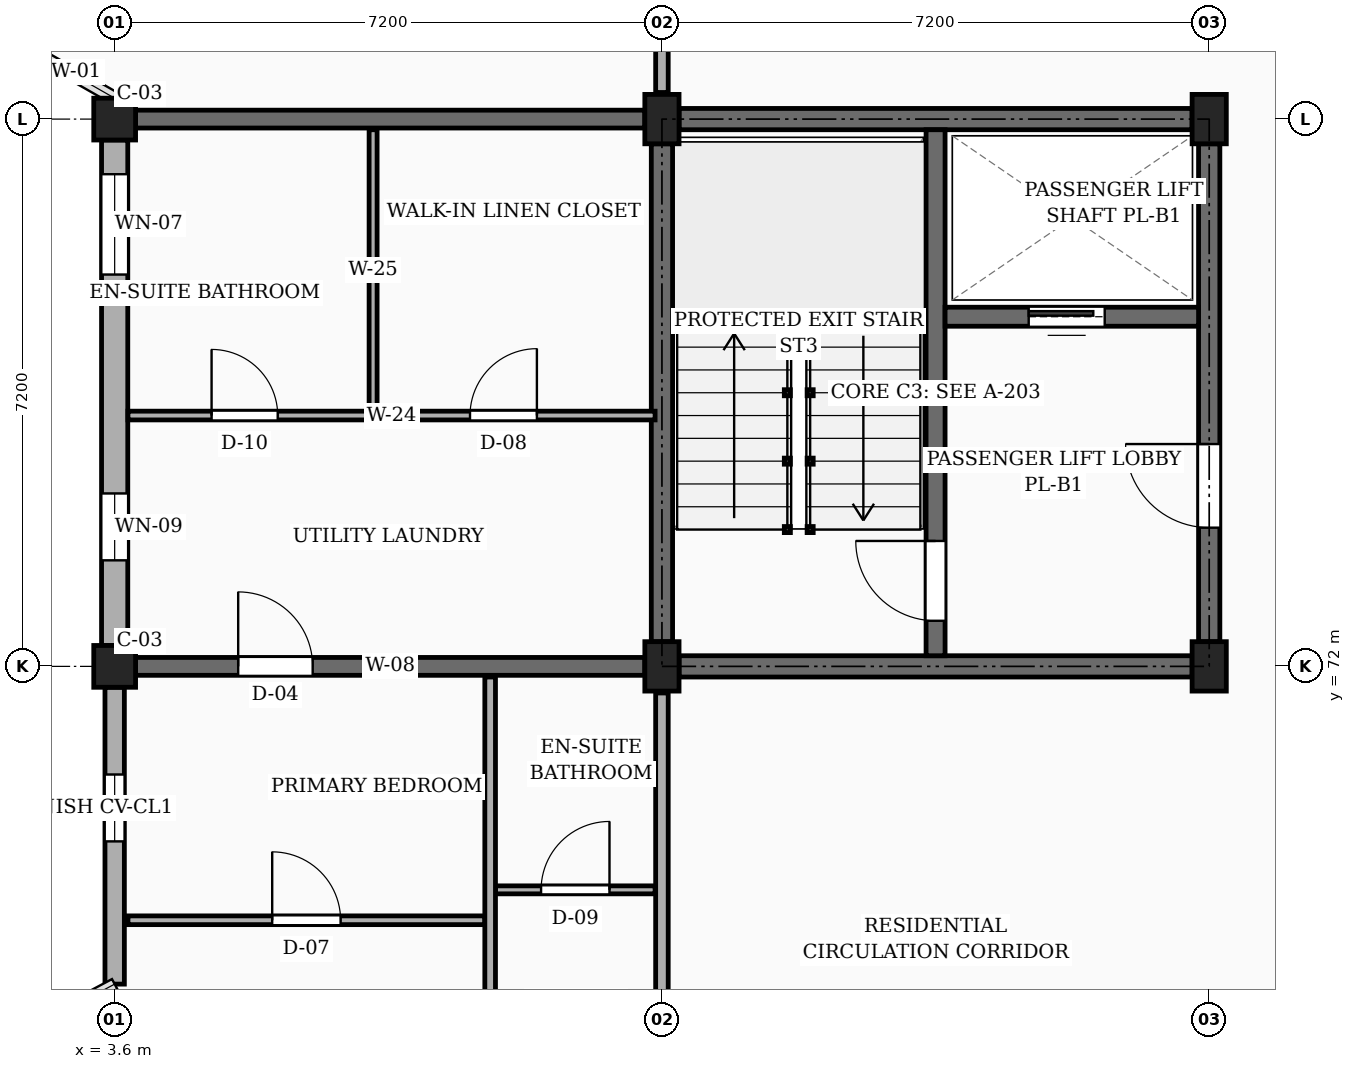
"""IFC4 building model, lengths in metres.
Left out: names, types, materials, properties, quantities, classifications, styles, units other than length and angle.
Written with IfcOpenShell. Run it as: python <this file> out.ifc"""

import sys

from ifc_helpers import new_model, si_unit, direction, frame, frame_2d, origin, origin_2d, place, context, subcontext, project, spatial, rectangle, extrude, element, fill, save


model = new_model("IFC4")
c1 = context("Model", 3, precision=1e-05, world=origin(), true_north=direction((0.0, 1.0)))
c2 = subcontext(c1, "Body", "Model", "MODEL_VIEW")
j1 = project(units=[si_unit("LENGTHUNIT", "METRE"), si_unit("PLANEANGLEUNIT", "RADIAN")], contexts=[c1])
p1 = place(None, origin())
s1 = spatial("IfcSite", under=j1, at=p1, CompositionType="ELEMENT")
p2 = place(p1, origin())
s2 = spatial("IfcBuilding", under=s1, at=p2, CompositionType="ELEMENT")
p3 = place(p2, frame((0.0, 0.0, 17.1)))
s3 = spatial("IfcBuildingStorey", under=s2, at=p3, CompositionType="ELEMENT", Elevation=17.1)
for number, where, z_axis, x_axis in (
    (1, (3.6, 72.0, 0.0), (0.0, 0.0, 1.0), (1.0, 0.0, 0.0)),
    (2, (3.6, 79.2, 0.0), (0.0, 0.0, 1.0), (1.0, 0.0, 0.0)),
):
    element("IfcColumn", number, at=place(p3, frame(where, z_axis=z_axis, x_axis=x_axis)), inside=s3, PredefinedType="COLUMN", context=c2, shape_type="SweptSolid", body=[
        extrude(rectangle(XDim=0.55, YDim=0.55, at=origin_2d()), origin(), (0.0, 0.0, 1.0), 3.15),
    ])
for number, where, z_axis, x_axis in (
    (3, (10.8, 72.0, 0.0), (0.0, 0.0, 1.0), (1.0, 0.0, 0.0)),
    (4, (10.8, 79.2, 0.0), (0.0, 0.0, 1.0), (1.0, 0.0, 0.0)),
    (5, (18.0, 72.0, 0.0), (0.0, 0.0, 1.0), (1.0, 0.0, 0.0)),
    (6, (18.0, 79.2, 0.0), (0.0, 0.0, 1.0), (1.0, 0.0, 0.0)),
):
    element("IfcColumn", number, at=place(p3, frame(where, z_axis=z_axis, x_axis=x_axis)), inside=s3, PredefinedType="COLUMN", context=c2, shape_type="SweptSolid", body=[
        extrude(rectangle(XDim=0.45, YDim=0.65, at=origin_2d()), origin(), (0.0, 0.0, 1.0), 3.15),
    ])
p4 = place(p3, frame((3.875, 72.0, 0.0), z_axis=(0.0, 0.0, 1.0), x_axis=(1.0, 0.0, 0.0)))
e7 = element("IfcWall", 7, at=p4, inside=s3, PredefinedType="SOLIDWALL", context=c2, shape_type="SweptSolid", body=[
    extrude(rectangle(XDim=6.7, YDim=0.235, at=frame_2d((3.35, 0.0))), origin(), (0.0, 0.0, 1.0), 2.21),
])
p5 = place(p4, frame((1.35, 0.0, 0.0)))
e8 = element("IfcOpeningElement", 8, at=p5, cuts=e7, PredefinedType="OPENING", context=c2, shape_type="SweptSolid", body=[
    extrude(rectangle(XDim=0.98, YDim=2.12, at=frame_2d((0.49, 1.06))), frame((0.0, 0.127, 0.0), z_axis=(0.0, -1.0, 0.0), x_axis=(1.0, 0.0, 0.0)), (0.0, 0.0, 1.0), 0.255),
])
p6 = place(p3, frame((3.875, 79.2, 0.0), z_axis=(0.0, 0.0, 1.0), x_axis=(1.0, 0.0, 0.0)))
e9 = element("IfcWall", 9, at=p6, inside=s3, PredefinedType="SOLIDWALL", context=c2, shape_type="SweptSolid", body=[
    extrude(rectangle(XDim=6.7, YDim=0.235, at=frame_2d((3.35, 0.0))), origin(), (0.0, 0.0, 1.0), 2.21),
])
p7 = place(p3, frame((3.6, 78.925, 0.0), z_axis=(0.0, 0.0, 1.0), x_axis=(0.0, -1.0, 0.0)))
e10 = element("IfcWall", 10, at=p7, inside=s3, PredefinedType="SOLIDWALL", context=c2, shape_type="SweptSolid", body=[
    extrude(rectangle(XDim=6.65, YDim=0.345, at=frame_2d((3.325, 0.0))), origin(), (0.0, 0.0, 1.0), 2.48),
])
p8 = place(p7, frame((0.45, 0.0, 0.78)))
e11 = element("IfcOpeningElement", 11, at=p8, cuts=e10, PredefinedType="OPENING", context=c2, shape_type="SweptSolid", body=[
    extrude(rectangle(XDim=1.32, YDim=1.15, at=frame_2d((0.66, 0.575))), frame((0.0, 0.183, 0.0), z_axis=(0.0, -1.0, 0.0), x_axis=(1.0, 0.0, 0.0)), (0.0, 0.0, 1.0), 0.365),
])
p9 = place(p7, frame((4.65, 0.0, 0.78)))
e12 = element("IfcOpeningElement", 12, at=p9, cuts=e10, PredefinedType="OPENING", context=c2, shape_type="SweptSolid", body=[
    extrude(rectangle(XDim=0.88, YDim=1.26, at=frame_2d((0.44, 0.63))), frame((0.0, 0.183, 0.0), z_axis=(0.0, -1.0, 0.0), x_axis=(1.0, 0.0, 0.0)), (0.0, 0.0, 1.0), 0.365),
])
p10 = place(p3, frame((3.6, 71.725, 0.0), z_axis=(0.0, 0.0, 1.0), x_axis=(0.0, -1.0, 0.0)))
e13 = element("IfcWall", 13, at=p10, inside=s3, PredefinedType="SOLIDWALL", context=c2, shape_type="SweptSolid", body=[
    extrude(rectangle(XDim=3.905, YDim=0.255, at=frame_2d((1.953, 0.0))), origin(), (0.0, 0.0, 1.0), 2.48),
])
p11 = place(p10, frame((1.147, 0.0, 0.78)))
e14 = element("IfcOpeningElement", 14, at=p11, cuts=e13, PredefinedType="OPENING", context=c2, shape_type="SweptSolid", body=[
    extrude(rectangle(XDim=0.88, YDim=1.26, at=frame_2d((0.44, 0.63))), frame((0.0, 0.137, 0.0), z_axis=(0.0, -1.0, 0.0), x_axis=(1.0, 0.0, 0.0)), (0.0, 0.0, 1.0), 0.275),
])
p12 = place(p3, frame((10.8, 72.325, 0.0), z_axis=(0.0, 0.0, 1.0), x_axis=(0.0, 1.0, 0.0)))
e15 = element("IfcWall", 15, at=p12, inside=s3, PredefinedType="SHEAR", context=c2, shape_type="SweptSolid", body=[
    extrude(rectangle(XDim=6.55, YDim=0.28, at=frame_2d((3.275, 0.0))), origin(), (0.0, 0.0, 1.0), 2.91),
])
p13 = place(p3, frame((11.025, 79.2, 0.0), z_axis=(0.0, 0.0, 1.0), x_axis=(1.0, 0.0, 0.0)))
e16 = element("IfcWall", 16, at=p13, inside=s3, PredefinedType="SHEAR", context=c2, shape_type="SweptSolid", body=[
    extrude(rectangle(XDim=6.75, YDim=0.28, at=frame_2d((3.375, 0.0))), origin(), (0.0, 0.0, 1.0), 2.91),
])
p14 = place(p3, frame((18.0, 72.325, 0.0), z_axis=(0.0, 0.0, 1.0), x_axis=(0.0, 1.0, 0.0)))
e17 = element("IfcWall", 17, at=p14, inside=s3, PredefinedType="SHEAR", context=c2, shape_type="SweptSolid", body=[
    extrude(rectangle(XDim=6.55, YDim=0.28, at=frame_2d((3.275, 0.0))), origin(), (0.0, 0.0, 1.0), 2.91),
])
p15 = place(p14, frame((1.5, 0.0, 0.0)))
e18 = element("IfcOpeningElement", 18, at=p15, cuts=e17, PredefinedType="OPENING", context=c2, shape_type="SweptSolid", body=[
    extrude(rectangle(XDim=1.1, YDim=2.15, at=frame_2d((0.55, 1.075))), frame((0.0, 0.15, 0.0), z_axis=(0.0, -1.0, 0.0), x_axis=(1.0, 0.0, 0.0)), (0.0, 0.0, 1.0), 0.3),
])
p16 = place(p3, frame((11.025, 72.0, 0.0), z_axis=(0.0, 0.0, 1.0), x_axis=(1.0, 0.0, 0.0)))
e19 = element("IfcWall", 19, at=p16, inside=s3, PredefinedType="SHEAR", context=c2, shape_type="SweptSolid", body=[
    extrude(rectangle(XDim=6.75, YDim=0.28, at=frame_2d((3.375, 0.0))), origin(), (0.0, 0.0, 1.0), 2.91),
])
p17 = place(p3, frame((14.4, 72.14, 0.0), z_axis=(0.0, 0.0, 1.0), x_axis=(0.0, 1.0, 0.0)))
e20 = element("IfcWall", 20, at=p17, inside=s3, PredefinedType="SHEAR", context=c2, shape_type="SweptSolid", body=[
    extrude(rectangle(XDim=6.92, YDim=0.25, at=frame_2d((3.46, 0.0))), origin(), (0.0, 0.0, 1.0), 2.91),
])
p18 = place(p17, frame((0.46, 0.0, 0.0)))
e21 = element("IfcOpeningElement", 21, at=p18, cuts=e20, PredefinedType="OPENING", context=c2, shape_type="SweptSolid", body=[
    extrude(rectangle(XDim=1.05, YDim=2.15, at=frame_2d((0.525, 1.075))), frame((0.0, 0.135, 0.0), z_axis=(0.0, -1.0, 0.0), x_axis=(1.0, 0.0, 0.0)), (0.0, 0.0, 1.0), 0.27),
])
p19 = place(p3, frame((14.525, 76.6, 0.0), z_axis=(0.0, 0.0, 1.0), x_axis=(1.0, 0.0, 0.0)))
e22 = element("IfcWall", 22, at=p19, inside=s3, PredefinedType="SHEAR", context=c2, shape_type="SweptSolid", body=[
    extrude(rectangle(XDim=3.335, YDim=0.25, at=frame_2d((1.667, 0.0))), origin(), (0.0, 0.0, 1.0), 2.91),
])
p20 = place(p19, frame((1.1, 0.0, 0.0)))
e23 = element("IfcOpeningElement", 23, at=p20, cuts=e22, PredefinedType="OPENING", context=c2, shape_type="SweptSolid", body=[
    extrude(rectangle(XDim=1.0, YDim=2.2, at=frame_2d((0.5, 1.1))), frame((0.0, 0.135, 0.0), z_axis=(0.0, -1.0, 0.0), x_axis=(1.0, 0.0, 0.0)), (0.0, 0.0, 1.0), 0.27),
])
p21 = place(p3, frame((10.8, 65.15, 0.0), z_axis=(0.0, 0.0, 1.0), x_axis=(0.0, 1.0, 0.0)))
e24 = element("IfcWall", 24, at=p21, inside=s3, PredefinedType="PARTITIONING", context=c2, shape_type="SweptSolid", body=[
    extrude(rectangle(XDim=6.5, YDim=0.165, at=frame_2d((3.25, 0.0))), origin(), (0.0, 0.0, 1.0), 2.345),
])
p22 = place(p21, frame((1.0, 0.0, 0.0)))
e25 = element("IfcOpeningElement", 25, at=p22, cuts=e24, PredefinedType="OPENING", context=c2, shape_type="SweptSolid", body=[
    extrude(rectangle(XDim=1.0, YDim=2.15, at=frame_2d((0.5, 1.075))), frame((0.0, 0.093, 0.0), z_axis=(0.0, -1.0, 0.0), x_axis=(1.0, 0.0, 0.0)), (0.0, 0.0, 1.0), 0.185),
])
p23 = place(p3, frame((10.8, 79.55, 0.0), z_axis=(0.0, 0.0, 1.0), x_axis=(0.0, 1.0, 0.0)))
e26 = element("IfcWall", 26, at=p23, inside=s3, PredefinedType="PARTITIONING", context=c2, shape_type="SweptSolid", body=[
    extrude(rectangle(XDim=6.5, YDim=0.165, at=frame_2d((3.25, 0.0))), origin(), (0.0, 0.0, 1.0), 2.345),
])
p24 = place(p23, frame((1.1, 0.0, 0.0)))
e27 = element("IfcOpeningElement", 27, at=p24, cuts=e26, PredefinedType="OPENING", context=c2, shape_type="SweptSolid", body=[
    extrude(rectangle(XDim=0.94, YDim=2.12, at=frame_2d((0.47, 1.06))), frame((0.0, 0.093, 0.0), z_axis=(0.0, -1.0, 0.0), x_axis=(1.0, 0.0, 0.0)), (0.0, 0.0, 1.0), 0.185),
])
p25 = place(p3, frame((3.775, 68.66, 0.0), z_axis=(0.0, 0.0, 1.0), x_axis=(1.0, 0.0, 0.0)))
e28 = element("IfcWall", 28, at=p25, inside=s3, PredefinedType="PARTITIONING", context=c2, shape_type="SweptSolid", body=[
    extrude(rectangle(XDim=4.695, YDim=0.115, at=frame_2d((2.348, 0.0))), origin(), (0.0, 0.0, 1.0), 2.345),
])
p26 = place(p25, frame((1.897, 0.0, 0.0)))
e29 = element("IfcOpeningElement", 29, at=p26, cuts=e28, PredefinedType="OPENING", context=c2, shape_type="SweptSolid", body=[
    extrude(rectangle(XDim=0.9, YDim=2.1, at=frame_2d((0.45, 1.05))), frame((0.0, 0.067, 0.0), z_axis=(0.0, -1.0, 0.0), x_axis=(1.0, 0.0, 0.0)), (0.0, 0.0, 1.0), 0.135),
])
p27 = place(p3, frame((8.61, 69.06, 0.0), z_axis=(0.0, 0.0, 1.0), x_axis=(1.0, 0.0, 0.0)))
e30 = element("IfcWall", 30, at=p27, inside=s3, PredefinedType="PARTITIONING", context=c2, shape_type="SweptSolid", body=[
    extrude(rectangle(XDim=2.1, YDim=0.105, at=frame_2d((1.05, 0.0))), origin(), (0.0, 0.0, 1.0), 2.345),
])
p28 = place(p27, frame((0.6, 0.0, 0.0)))
e31 = element("IfcOpeningElement", 31, at=p28, cuts=e30, PredefinedType="OPENING", context=c2, shape_type="SweptSolid", body=[
    extrude(rectangle(XDim=0.9, YDim=2.05, at=frame_2d((0.45, 1.025))), frame((0.0, 0.062, 0.0), z_axis=(0.0, -1.0, 0.0), x_axis=(1.0, 0.0, 0.0)), (0.0, 0.0, 1.0), 0.125),
])
p29 = place(p3, frame((8.54, 64.975, 0.0), z_axis=(0.0, 0.0, 1.0), x_axis=(0.0, 1.0, 0.0)))
e32 = element("IfcWall", 32, at=p29, inside=s3, PredefinedType="PARTITIONING", context=c2, shape_type="SweptSolid", body=[
    extrude(rectangle(XDim=6.885, YDim=0.14, at=frame_2d((3.442, 0.0))), origin(), (0.0, 0.0, 1.0), 2.345),
])
p30 = place(p29, frame((1.275, 0.0, 0.0)))
e33 = element("IfcOpeningElement", 33, at=p30, cuts=e32, PredefinedType="OPENING", context=c2, shape_type="SweptSolid", body=[
    extrude(rectangle(XDim=0.95, YDim=2.1, at=frame_2d((0.475, 1.05))), frame((0.0, 0.08, 0.0), z_axis=(0.0, -1.0, 0.0), x_axis=(1.0, 0.0, 0.0)), (0.0, 0.0, 1.0), 0.16),
])
p31 = place(p3, frame((3.775, 75.3, 0.0), z_axis=(0.0, 0.0, 1.0), x_axis=(1.0, 0.0, 0.0)))
e34 = element("IfcWall", 34, at=p31, inside=s3, PredefinedType="PARTITIONING", context=c2, shape_type="SweptSolid", body=[
    extrude(rectangle(XDim=6.935, YDim=0.115, at=frame_2d((3.468, 0.0))), origin(), (0.0, 0.0, 1.0), 2.345),
])
p32 = place(p31, frame((1.1, 0.0, 0.0)))
e35 = element("IfcOpeningElement", 35, at=p32, cuts=e34, PredefinedType="OPENING", context=c2, shape_type="SweptSolid", body=[
    extrude(rectangle(XDim=0.87, YDim=2.05, at=frame_2d((0.435, 1.025))), frame((0.0, 0.067, 0.0), z_axis=(0.0, -1.0, 0.0), x_axis=(1.0, 0.0, 0.0)), (0.0, 0.0, 1.0), 0.135),
])
p33 = place(p31, frame((4.5, 0.0, 0.0)))
e36 = element("IfcOpeningElement", 36, at=p33, cuts=e34, PredefinedType="OPENING", context=c2, shape_type="SweptSolid", body=[
    extrude(rectangle(XDim=0.88, YDim=2.08, at=frame_2d((0.44, 1.04))), frame((0.0, 0.067, 0.0), z_axis=(0.0, -1.0, 0.0), x_axis=(1.0, 0.0, 0.0)), (0.0, 0.0, 1.0), 0.135),
])
p34 = place(p3, frame((7.0, 75.37, 0.0), z_axis=(0.0, 0.0, 1.0), x_axis=(0.0, 1.0, 0.0)))
e37 = element("IfcWall", 37, at=p34, inside=s3, PredefinedType="PARTITIONING", context=c2, shape_type="SweptSolid", body=[
    extrude(rectangle(XDim=3.69, YDim=0.105, at=frame_2d((1.845, 0.0))), origin(), (0.0, 0.0, 1.0), 2.345),
])
p35 = place(p8, origin())
e38 = element("IfcWindow", 38, at=p35, inside=s3, PartitioningType="SINGLE_PANEL", PredefinedType="WINDOW", context=c2, shape_type="SweptSolid", body=[
    extrude(rectangle(XDim=1.32, YDim=1.15, at=frame_2d((0.66, 0.575))), frame((0.0, 0.03, 0.0), z_axis=(0.0, -1.0, 0.0), x_axis=(1.0, 0.0, 0.0)), (0.0, 0.0, 1.0), 0.06),
])
fill(e11, e38)
p36 = place(p9, origin())
e39 = element("IfcWindow", 39, at=p36, inside=s3, PartitioningType="SINGLE_PANEL", PredefinedType="WINDOW", context=c2, shape_type="SweptSolid", body=[
    extrude(rectangle(XDim=0.88, YDim=1.26, at=frame_2d((0.44, 0.63))), frame((0.0, 0.03, 0.0), z_axis=(0.0, -1.0, 0.0), x_axis=(1.0, 0.0, 0.0)), (0.0, 0.0, 1.0), 0.06),
])
fill(e12, e39)
p37 = place(p11, origin())
e40 = element("IfcWindow", 40, at=p37, inside=s3, PartitioningType="SINGLE_PANEL", PredefinedType="WINDOW", context=c2, shape_type="SweptSolid", body=[
    extrude(rectangle(XDim=0.88, YDim=1.26, at=frame_2d((0.44, 0.63))), frame((0.0, 0.03, 0.0), z_axis=(0.0, -1.0, 0.0), x_axis=(1.0, 0.0, 0.0)), (0.0, 0.0, 1.0), 0.06),
])
fill(e14, e40)
p38 = place(p15, frame((1.1, 0.0, 0.0), z_axis=(0.0, 0.0, 1.0), x_axis=(-1.0, 0.0, 0.0)))
e41 = element("IfcDoor", 41, at=p38, inside=s3, OperationType="SINGLE_SWING_RIGHT", PredefinedType="DOOR", context=c2, shape_type="SweptSolid", body=[
    extrude(rectangle(XDim=1.1, YDim=2.15, at=frame_2d((0.55, 1.075))), frame((0.0, 0.025, 0.0), z_axis=(0.0, -1.0, 0.0), x_axis=(1.0, 0.0, 0.0)), (0.0, 0.0, 1.0), 0.05),
])
fill(e18, e41)
p39 = place(p18, origin())
e42 = element("IfcDoor", 42, at=p39, inside=s3, OperationType="SINGLE_SWING_RIGHT", PredefinedType="DOOR", context=c2, shape_type="SweptSolid", body=[
    extrude(rectangle(XDim=1.05, YDim=2.15, at=frame_2d((0.525, 1.075))), frame((0.0, 0.025, 0.0), z_axis=(0.0, -1.0, 0.0), x_axis=(1.0, 0.0, 0.0)), (0.0, 0.0, 1.0), 0.05),
])
fill(e21, e42)
p40 = place(p20, origin())
e43 = element("IfcDoor", 43, at=p40, inside=s3, OperationType="SLIDING_TO_LEFT", PredefinedType="DOOR", context=c2, shape_type="SweptSolid", body=[
    extrude(rectangle(XDim=1.0, YDim=2.2, at=frame_2d((0.5, 1.1))), frame((0.0, 0.025, 0.0), z_axis=(0.0, -1.0, 0.0), x_axis=(1.0, 0.0, 0.0)), (0.0, 0.0, 1.0), 0.05),
])
fill(e23, e43)
p41 = place(p26, origin())
e44 = element("IfcDoor", 44, at=p41, inside=s3, OperationType="SINGLE_SWING_LEFT", PredefinedType="DOOR", context=c2, shape_type="SweptSolid", body=[
    extrude(rectangle(XDim=0.9, YDim=2.1, at=frame_2d((0.45, 1.05))), frame((0.0, 0.025, 0.0), z_axis=(0.0, -1.0, 0.0), x_axis=(1.0, 0.0, 0.0)), (0.0, 0.0, 1.0), 0.05),
])
fill(e29, e44)
p42 = place(p28, origin())
e45 = element("IfcDoor", 45, at=p42, inside=s3, OperationType="SINGLE_SWING_RIGHT", PredefinedType="DOOR", context=c2, shape_type="SweptSolid", body=[
    extrude(rectangle(XDim=0.9, YDim=2.05, at=frame_2d((0.45, 1.025))), frame((0.0, 0.025, 0.0), z_axis=(0.0, -1.0, 0.0), x_axis=(1.0, 0.0, 0.0)), (0.0, 0.0, 1.0), 0.05),
])
fill(e31, e45)
p43 = place(p32, origin())
e46 = element("IfcDoor", 46, at=p43, inside=s3, OperationType="SINGLE_SWING_LEFT", PredefinedType="DOOR", context=c2, shape_type="SweptSolid", body=[
    extrude(rectangle(XDim=0.87, YDim=2.05, at=frame_2d((0.435, 1.025))), frame((0.0, 0.025, 0.0), z_axis=(0.0, -1.0, 0.0), x_axis=(1.0, 0.0, 0.0)), (0.0, 0.0, 1.0), 0.05),
])
fill(e35, e46)
p44 = place(p33, origin())
e47 = element("IfcDoor", 47, at=p44, inside=s3, OperationType="SINGLE_SWING_RIGHT", PredefinedType="DOOR", context=c2, shape_type="SweptSolid", body=[
    extrude(rectangle(XDim=0.88, YDim=2.08, at=frame_2d((0.44, 1.04))), frame((0.0, 0.025, 0.0), z_axis=(0.0, -1.0, 0.0), x_axis=(1.0, 0.0, 0.0)), (0.0, 0.0, 1.0), 0.05),
])
fill(e36, e47)
p45 = place(p5, origin())
e48 = element("IfcDoor", 48, at=p45, inside=s3, OperationType="SINGLE_SWING_LEFT", PredefinedType="DOOR", context=c2, shape_type="SweptSolid", body=[
    extrude(rectangle(XDim=0.98, YDim=2.12, at=frame_2d((0.49, 1.06))), frame((0.0, 0.025, 0.0), z_axis=(0.0, -1.0, 0.0), x_axis=(1.0, 0.0, 0.0)), (0.0, 0.0, 1.0), 0.05),
])
fill(e8, e48)
save(model, sys.argv[1])
